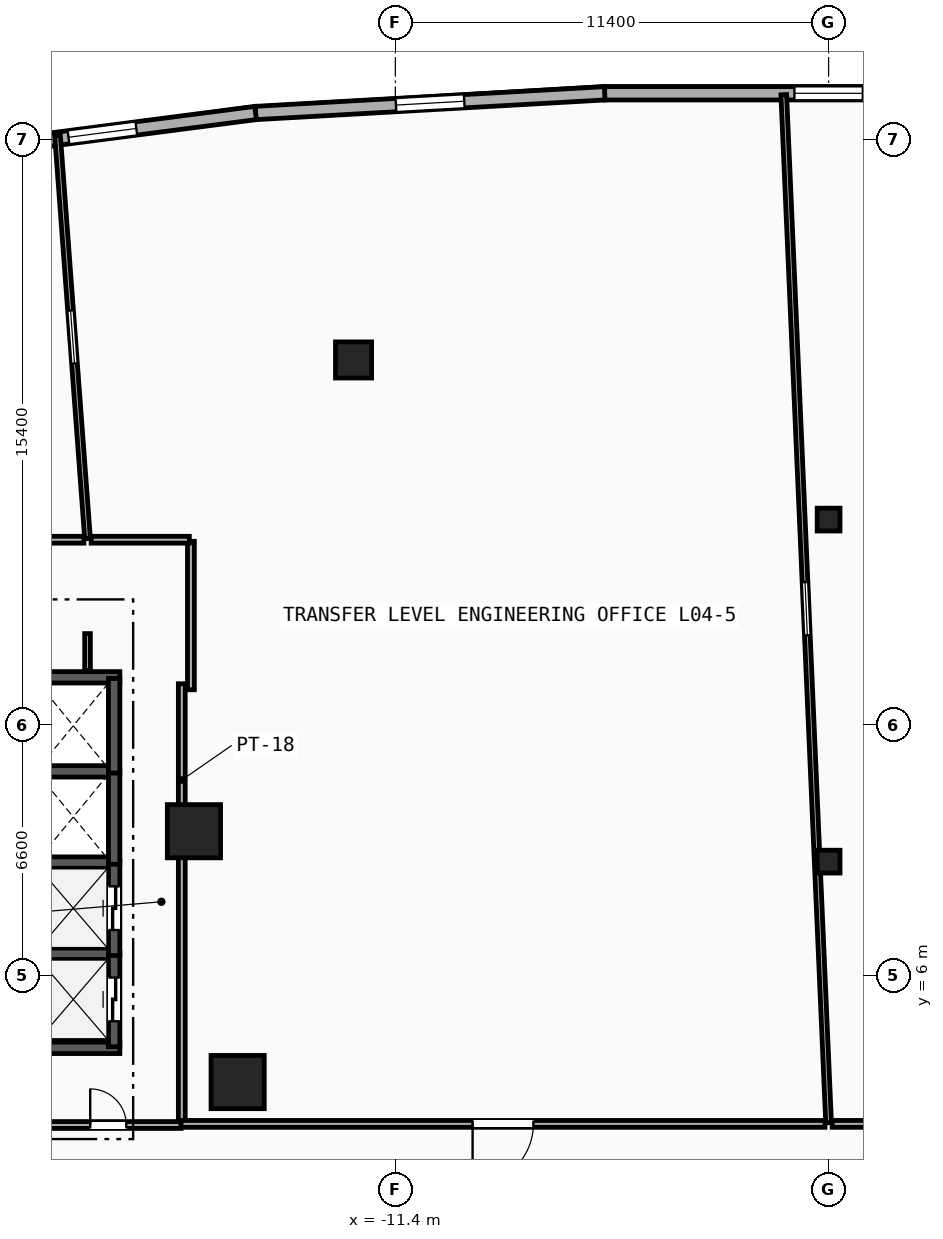
"""IFC4 building model, lengths in metres.
Left out: names, types, materials, properties, quantities, classifications, styles, units other than length and angle.
Written with IfcOpenShell. Run it as: python <this file> out.ifc"""

import sys

from ifc_helpers import new_model, si_unit, direction, frame, frame_2d, origin, origin_2d, place, context, subcontext, project, spatial, rectangle, hollow_rectangle, circle, extrude, element, fill, save


model = new_model("IFC4")
c1 = context("Model", 3, precision=1e-05, world=origin(), true_north=direction((0.0, 1.0)))
c2 = subcontext(c1, "Body", "Model", "MODEL_VIEW")
j1 = project(units=[si_unit("LENGTHUNIT", "METRE"), si_unit("PLANEANGLEUNIT", "RADIAN")], contexts=[c1])
p1 = place(None, origin())
s1 = spatial("IfcSite", under=j1, at=p1, CompositionType="ELEMENT")
p2 = place(p1, origin())
s2 = spatial("IfcBuilding", under=s1, at=p2, CompositionType="ELEMENT")
p3 = place(p2, frame((0.0, 0.0, 20.0)))
s3 = spatial("IfcBuildingStorey", under=s2, at=p3, CompositionType="ELEMENT", Elevation=20.0)
for number, where, z_axis, x_axis in (
    (1, (-15.55, 3.2, 0.0), (0.0, 0.0, 1.0), (1.0, 0.0, 0.0)),
    (2, (-16.7, 9.8, 0.0), (0.0, 0.0, 1.0), (1.0, 0.0, 0.0)),
):
    element("IfcColumn", number, at=place(p3, frame(where, z_axis=z_axis, x_axis=x_axis)), inside=s3, PredefinedType="COLUMN", context=c2, shape_type="SweptSolid", body=[
        extrude(rectangle(XDim=1.4, YDim=1.4, at=origin_2d()), origin(), (0.0, 0.0, 1.0), 4.0),
    ])
for number, where, z_axis, x_axis in (
    (3, (0.0, 9.0, 0.0), (0.0, 0.0, 1.0), (1.0, 0.0, 0.0)),
    (4, (0.0, 18.0, 0.0), (0.0, 0.0, 1.0), (1.0, 0.0, 0.0)),
):
    element("IfcColumn", number, at=place(p3, frame(where, z_axis=z_axis, x_axis=x_axis)), inside=s3, PredefinedType="COLUMN", context=c2, shape_type="SweptSolid", body=[
        extrude(hollow_rectangle(XDim=0.6, YDim=0.6, WallThickness=0.032, at=origin_2d()), origin(), (0.0, 0.0, 1.0), 3.695),
    ])
p4 = place(p3, frame((-12.5, 22.2, 0.0), z_axis=(0.0, 0.0, 1.0), x_axis=(1.0, 0.0, 0.0)))
e5 = element("IfcColumn", 5, at=p4, inside=s3, PredefinedType="PILASTER", context=c2, shape_type="SweptSolid", body=[
    extrude(circle(Radius=0.475, at=origin_2d()), origin(), (0.0, 0.0, 1.0), 3.695),
])
p5 = place(p3, frame((5.893, 29.216, 0.0), z_axis=(0.0, 0.0, 1.0), x_axis=(-1.0, 0.0, 0.0)))
e6 = element("IfcWall", 6, at=p5, inside=s3, PredefinedType="SOLIDWALL", context=c2, shape_type="SweptSolid", body=[
    extrude(rectangle(XDim=11.785, YDim=0.35, at=frame_2d((5.893, 0.0))), origin(), (0.0, 0.0, 1.0), 3.7),
])
p6 = place(p5, frame((4.992, 0.0, 0.45)))
e7 = element("IfcOpeningElement", 7, at=p6, cuts=e6, PredefinedType="OPENING", context=c2, shape_type="SweptSolid", body=[
    extrude(rectangle(XDim=1.8, YDim=2.4, at=frame_2d((0.9, 1.2))), frame((0.0, 0.185, 0.0), z_axis=(0.0, -1.0, 0.0), x_axis=(1.0, 0.0, 0.0)), (0.0, 0.0, 1.0), 0.37),
])
p7 = place(p3, frame((-5.893, 29.216, 0.0), z_axis=(0.0, 0.0, 1.0), x_axis=(-0.998413463137, -0.056307695976, 0.0)))
e8 = element("IfcWall", 8, at=p7, inside=s3, PredefinedType="SOLIDWALL", context=c2, shape_type="SweptSolid", body=[
    extrude(rectangle(XDim=9.201, YDim=0.35, at=frame_2d((4.6, 0.0))), origin(), (0.0, 0.0, 1.0), 3.7),
])
p8 = place(p7, frame((3.7, 0.0, 0.45)))
e9 = element("IfcOpeningElement", 9, at=p8, cuts=e8, PredefinedType="OPENING", context=c2, shape_type="SweptSolid", body=[
    extrude(rectangle(XDim=1.8, YDim=2.4, at=frame_2d((0.9, 1.2))), frame((0.0, 0.185, 0.0), z_axis=(0.0, -1.0, 0.0), x_axis=(1.0, 0.0, 0.0)), (0.0, 0.0, 1.0), 0.37),
])
p9 = place(p3, frame((-15.079, 28.698, 0.0), z_axis=(0.0, 0.0, 1.0), x_axis=(-0.991688106477, -0.128665067026, 0.0)))
e10 = element("IfcWall", 10, at=p9, inside=s3, PredefinedType="SOLIDWALL", context=c2, shape_type="SweptSolid", body=[
    extrude(rectangle(XDim=8.129, YDim=0.35, at=frame_2d((4.064, 0.0))), origin(), (0.0, 0.0, 1.0), 3.7),
])
p10 = place(p9, frame((3.164, 0.0, 0.45)))
e11 = element("IfcOpeningElement", 11, at=p10, cuts=e10, PredefinedType="OPENING", context=c2, shape_type="SweptSolid", body=[
    extrude(rectangle(XDim=1.8, YDim=2.4, at=frame_2d((0.9, 1.2))), frame((0.0, 0.185, 0.0), z_axis=(0.0, -1.0, 0.0), x_axis=(1.0, 0.0, 0.0)), (0.0, 0.0, 1.0), 0.37),
])
for number, where, z_axis, x_axis in (
    (12, (-20.8, 4.1, 0.0), (0.0, 0.0, 1.0), (1.0, 0.0, 0.0)),
    (13, (-20.8, 13.85, 0.0), (0.0, 0.0, 1.0), (1.0, 0.0, 0.0)),
):
    element("IfcWall", number, at=place(p3, frame(where, z_axis=z_axis, x_axis=x_axis)), inside=s3, PredefinedType="SHEAR", context=c2, shape_type="SweptSolid", body=[
        extrude(rectangle(XDim=2.15, YDim=0.3, at=frame_2d((1.075, 0.0))), origin(), (0.0, 0.0, 1.0), 3.7),
    ])
for number, where, z_axis, x_axis in (
    (14, (-20.8, 6.575, 0.0), (0.0, 0.0, 1.0), (1.0, 0.0, 0.0)),
    (15, (-20.8, 8.975, 0.0), (0.0, 0.0, 1.0), (1.0, 0.0, 0.0)),
    (16, (-20.8, 11.375, 0.0), (0.0, 0.0, 1.0), (1.0, 0.0, 0.0)),
):
    element("IfcWall", number, at=place(p3, frame(where, z_axis=z_axis, x_axis=x_axis)), inside=s3, PredefinedType="SHEAR", context=c2, shape_type="SweptSolid", body=[
        extrude(rectangle(XDim=1.85, YDim=0.3, at=frame_2d((0.925, 0.0))), origin(), (0.0, 0.0, 1.0), 3.7),
    ])
p11 = place(p3, frame((-18.8, 4.13, 0.0), z_axis=(0.0, 0.0, 1.0), x_axis=(0.0, 1.0, 0.0)))
e17 = element("IfcWall", 17, at=p11, inside=s3, PredefinedType="SHEAR", context=c2, shape_type="SweptSolid", body=[
    extrude(rectangle(XDim=2.49, YDim=0.3, at=frame_2d((1.245, 0.0))), origin(), (0.0, 0.0, 1.0), 3.7),
])
p12 = place(p11, frame((0.67, 0.0, 0.0)))
e18 = element("IfcOpeningElement", 18, at=p12, cuts=e17, PredefinedType="OPENING", context=c2, shape_type="SweptSolid", body=[
    extrude(rectangle(XDim=1.15, YDim=2.2, at=frame_2d((0.575, 1.1))), frame((0.0, 0.16, 0.0), z_axis=(0.0, -1.0, 0.0), x_axis=(1.0, 0.0, 0.0)), (0.0, 0.0, 1.0), 0.32),
])
p13 = place(p3, frame((-18.8, 6.53, 0.0), z_axis=(0.0, 0.0, 1.0), x_axis=(0.0, 1.0, 0.0)))
e19 = element("IfcWall", 19, at=p13, inside=s3, PredefinedType="SHEAR", context=c2, shape_type="SweptSolid", body=[
    extrude(rectangle(XDim=2.49, YDim=0.3, at=frame_2d((1.245, 0.0))), origin(), (0.0, 0.0, 1.0), 3.7),
])
p14 = place(p13, frame((0.67, 0.0, 0.0)))
e20 = element("IfcOpeningElement", 20, at=p14, cuts=e19, PredefinedType="OPENING", context=c2, shape_type="SweptSolid", body=[
    extrude(rectangle(XDim=1.15, YDim=2.2, at=frame_2d((0.575, 1.1))), frame((0.0, 0.16, 0.0), z_axis=(0.0, -1.0, 0.0), x_axis=(1.0, 0.0, 0.0)), (0.0, 0.0, 1.0), 0.32),
])
for number, where, z_axis, x_axis in (
    (21, (-18.8, 8.93, 0.0), (0.0, 0.0, 1.0), (0.0, 1.0, 0.0)),
    (22, (-18.8, 11.33, 0.0), (0.0, 0.0, 1.0), (0.0, 1.0, 0.0)),
):
    element("IfcWall", number, at=place(p3, frame(where, z_axis=z_axis, x_axis=x_axis)), inside=s3, PredefinedType="SHEAR", context=c2, shape_type="SweptSolid", body=[
        extrude(rectangle(XDim=2.49, YDim=0.3, at=frame_2d((1.245, 0.0))), origin(), (0.0, 0.0, 1.0), 3.7),
    ])
p15 = place(p3, frame((-17.02, 2.17, 0.0), z_axis=(0.0, 0.0, 1.0), x_axis=(0.0, 1.0, 0.0)))
e23 = element("IfcWall", 23, at=p15, inside=s3, PredefinedType="PARTITIONING", context=c2, shape_type="SweptSolid", body=[
    extrude(rectangle(XDim=11.51, YDim=0.18, at=frame_2d((5.755, 0.0))), origin(), (0.0, 0.0, 1.0), 1.9),
])
p16 = place(p3, frame((-20.87, 2.07, 0.0), z_axis=(0.0, 0.0, 1.0), x_axis=(1.0, 0.0, 0.0)))
e24 = element("IfcWall", 24, at=p16, inside=s3, PredefinedType="PARTITIONING", context=c2, shape_type="SweptSolid", body=[
    extrude(rectangle(XDim=3.83, YDim=0.18, at=frame_2d((1.915, 0.0))), origin(), (0.0, 0.0, 1.0), 3.7),
])
p17 = place(p16, frame((1.44, 0.0, 0.0)))
e25 = element("IfcOpeningElement", 25, at=p17, cuts=e24, PredefinedType="OPENING", context=c2, shape_type="SweptSolid", body=[
    extrude(rectangle(XDim=0.95, YDim=2.1, at=frame_2d((0.475, 1.05))), frame((0.0, 0.1, 0.0), z_axis=(0.0, -1.0, 0.0), x_axis=(1.0, 0.0, 0.0)), (0.0, 0.0, 1.0), 0.2),
])
p18 = place(p3, frame((-19.5, 14.03, 0.0), z_axis=(0.0, 0.0, 1.0), x_axis=(0.0, 1.0, 0.0)))
e26 = element("IfcWall", 26, at=p18, inside=s3, PredefinedType="PARTITIONING", context=c2, shape_type="SweptSolid", body=[
    extrude(rectangle(XDim=0.97, YDim=0.15, at=frame_2d((0.485, 0.0))), origin(), (0.0, 0.0, 1.0), 3.7),
])
p19 = place(p3, frame((-19.5, 17.5, 0.0), z_axis=(0.0, 0.0, 1.0), x_axis=(-0.074269014628, 0.997238243082, 0.0)))
e27 = element("IfcWall", 27, at=p19, inside=s3, PredefinedType="PARTITIONING", context=c2, shape_type="SweptSolid", body=[
    extrude(rectangle(XDim=10.637, YDim=0.15, at=frame_2d((5.319, 0.0))), origin(), (0.0, 0.0, 1.0), 3.7),
])
p20 = place(p19, frame((4.619, 0.0, 1.05)))
e28 = element("IfcOpeningElement", 28, at=p20, cuts=e27, PredefinedType="OPENING", context=c2, shape_type="SweptSolid", body=[
    extrude(rectangle(XDim=1.4, YDim=1.5, at=frame_2d((0.7, 0.75))), frame((0.0, 0.085, 0.0), z_axis=(0.0, -1.0, 0.0), x_axis=(1.0, 0.0, 0.0)), (0.0, 0.0, 1.0), 0.17),
])
p21 = place(p3, frame((0.0, 2.13, 0.0), z_axis=(0.0, 0.0, 1.0), x_axis=(-0.043560875221, 0.999050774561, 0.0)))
e29 = element("IfcWall", 29, at=p21, inside=s3, PredefinedType="PARTITIONING", context=c2, shape_type="SweptSolid", body=[
    extrude(rectangle(XDim=27.076, YDim=0.15, at=frame_2d((13.538, 0.0))), origin(), (0.0, 0.0, 1.0), 2.922),
])
p22 = place(p21, frame((12.838, 0.0, 1.05)))
e30 = element("IfcOpeningElement", 30, at=p22, cuts=e29, PredefinedType="OPENING", context=c2, shape_type="SweptSolid", body=[
    extrude(rectangle(XDim=1.4, YDim=1.5, at=frame_2d((0.7, 0.75))), frame((0.0, 0.085, 0.0), z_axis=(0.0, -1.0, 0.0), x_axis=(1.0, 0.0, 0.0)), (0.0, 0.0, 1.0), 0.17),
])
p23 = place(p3, frame((-19.595, 17.47, 0.0), z_axis=(0.0, 0.0, 1.0), x_axis=(-1.0, 0.0, 0.0)))
e31 = element("IfcWall", 31, at=p23, inside=s3, PredefinedType="PARTITIONING", context=c2, shape_type="SweptSolid", body=[
    extrude(rectangle(XDim=14.033, YDim=0.18, at=frame_2d((7.017, 0.0))), origin(), (0.0, 0.0, 1.0), 1.9),
])
p24 = place(p3, frame((-0.095, 2.1, 0.0), z_axis=(0.0, 0.0, 1.0), x_axis=(-1.0, 0.0, 0.0)))
e32 = element("IfcWall", 32, at=p24, inside=s3, PredefinedType="PARTITIONING", context=c2, shape_type="SweptSolid", body=[
    extrude(rectangle(XDim=16.945, YDim=0.18, at=frame_2d((8.473, 0.0))), origin(), (0.0, 0.0, 1.0), 2.922),
])
p25 = place(p24, frame((7.673, 0.0, 0.0)))
e33 = element("IfcOpeningElement", 33, at=p25, cuts=e32, PredefinedType="OPENING", context=c2, shape_type="SweptSolid", body=[
    extrude(rectangle(XDim=1.6, YDim=2.2, at=frame_2d((0.8, 1.1))), frame((0.0, 0.1, 0.0), z_axis=(0.0, -1.0, 0.0), x_axis=(1.0, 0.0, 0.0)), (0.0, 0.0, 1.0), 0.2),
])
p26 = place(p3, frame((-16.78, 13.521, 0.0), z_axis=(0.0, 0.0, 1.0), x_axis=(0.0, 1.0, 0.0)))
e34 = element("IfcWall", 34, at=p26, inside=s3, PredefinedType="PARTITIONING", context=c2, shape_type="SweptSolid", body=[
    extrude(rectangle(XDim=3.907, YDim=0.18, at=frame_2d((1.954, 0.0))), origin(), (0.0, 0.0, 1.0), 3.7),
])
p27 = place(p3, frame((-16.822, 17.47, 0.0), z_axis=(0.0, 0.0, 1.0), x_axis=(-1.0, 0.0, 0.0)))
e35 = element("IfcWall", 35, at=p27, inside=s3, PredefinedType="PARTITIONING", context=c2, shape_type="SweptSolid", body=[
    extrude(rectangle(XDim=2.583, YDim=0.18, at=frame_2d((1.292, 0.0))), origin(), (0.0, 0.0, 1.0), 3.7),
])
p28 = place(p3, frame((8.1, 2.1, 0.0), z_axis=(0.0, 0.0, 1.0), x_axis=(-1.0, 0.0, 0.0)))
e36 = element("IfcWall", 36, at=p28, inside=s3, PredefinedType="PARTITIONING", context=c2, shape_type="SweptSolid", body=[
    extrude(rectangle(XDim=8.005, YDim=0.18, at=frame_2d((4.002, 0.0))), origin(), (0.0, 0.0, 1.0), 3.7),
])
p29 = place(p28, frame((3.002, 0.0, 1.05)))
e37 = element("IfcOpeningElement", 37, at=p29, cuts=e36, PredefinedType="OPENING", context=c2, shape_type="SweptSolid", body=[
    extrude(rectangle(XDim=2.0, YDim=1.5, at=frame_2d((1.0, 0.75))), frame((0.0, 0.1, 0.0), z_axis=(0.0, -1.0, 0.0), x_axis=(1.0, 0.0, 0.0)), (0.0, 0.0, 1.0), 0.2),
])
p30 = place(p6, origin())
e38 = element("IfcWindow", 38, at=p30, inside=s3, PartitioningType="SINGLE_PANEL", PredefinedType="WINDOW", context=c2, shape_type="SweptSolid", body=[
    extrude(rectangle(XDim=1.8, YDim=2.4, at=frame_2d((0.9, 1.2))), frame((0.0, 0.03, 0.0), z_axis=(0.0, -1.0, 0.0), x_axis=(1.0, 0.0, 0.0)), (0.0, 0.0, 1.0), 0.06),
])
fill(e7, e38)
p31 = place(p8, origin())
e39 = element("IfcWindow", 39, at=p31, inside=s3, PartitioningType="SINGLE_PANEL", PredefinedType="WINDOW", context=c2, shape_type="SweptSolid", body=[
    extrude(rectangle(XDim=1.8, YDim=2.4, at=frame_2d((0.9, 1.2))), frame((0.0, 0.03, 0.0), z_axis=(0.0, -1.0, 0.0), x_axis=(1.0, 0.0, 0.0)), (0.0, 0.0, 1.0), 0.06),
])
fill(e9, e39)
p32 = place(p10, origin())
e40 = element("IfcWindow", 40, at=p32, inside=s3, PartitioningType="SINGLE_PANEL", PredefinedType="WINDOW", context=c2, shape_type="SweptSolid", body=[
    extrude(rectangle(XDim=1.8, YDim=2.4, at=frame_2d((0.9, 1.2))), frame((0.0, 0.03, 0.0), z_axis=(0.0, -1.0, 0.0), x_axis=(1.0, 0.0, 0.0)), (0.0, 0.0, 1.0), 0.06),
])
fill(e11, e40)
p33 = place(p12, origin())
e41 = element("IfcDoor", 41, at=p33, inside=s3, OperationType="SLIDING_TO_LEFT", PredefinedType="TRAPDOOR", context=c2, shape_type="SweptSolid", body=[
    extrude(rectangle(XDim=1.15, YDim=2.2, at=frame_2d((0.575, 1.1))), frame((0.0, 0.025, 0.0), z_axis=(0.0, -1.0, 0.0), x_axis=(1.0, 0.0, 0.0)), (0.0, 0.0, 1.0), 0.05),
])
fill(e18, e41)
p34 = place(p14, origin())
e42 = element("IfcDoor", 42, at=p34, inside=s3, OperationType="SLIDING_TO_LEFT", PredefinedType="TRAPDOOR", context=c2, shape_type="SweptSolid", body=[
    extrude(rectangle(XDim=1.15, YDim=2.2, at=frame_2d((0.575, 1.1))), frame((0.0, 0.025, 0.0), z_axis=(0.0, -1.0, 0.0), x_axis=(1.0, 0.0, 0.0)), (0.0, 0.0, 1.0), 0.05),
])
fill(e20, e42)
p35 = place(p25, origin())
e43 = element("IfcDoor", 43, at=p35, inside=s3, OperationType="SINGLE_SWING_RIGHT", PredefinedType="DOOR", context=c2, shape_type="SweptSolid", body=[
    extrude(rectangle(XDim=1.6, YDim=2.2, at=frame_2d((0.8, 1.1))), frame((0.0, 0.025, 0.0), z_axis=(0.0, -1.0, 0.0), x_axis=(1.0, 0.0, 0.0)), (0.0, 0.0, 1.0), 0.05),
])
fill(e33, e43)
p36 = place(p17, origin())
e44 = element("IfcDoor", 44, at=p36, inside=s3, OperationType="SINGLE_SWING_LEFT", PredefinedType="DOOR", context=c2, shape_type="SweptSolid", body=[
    extrude(rectangle(XDim=0.95, YDim=2.1, at=frame_2d((0.475, 1.05))), frame((0.0, 0.025, 0.0), z_axis=(0.0, -1.0, 0.0), x_axis=(1.0, 0.0, 0.0)), (0.0, 0.0, 1.0), 0.05),
])
fill(e25, e44)
p37 = place(p20, origin())
e45 = element("IfcWindow", 45, at=p37, inside=s3, PartitioningType="SINGLE_PANEL", PredefinedType="WINDOW", context=c2, shape_type="SweptSolid", body=[
    extrude(rectangle(XDim=1.4, YDim=1.5, at=frame_2d((0.7, 0.75))), frame((0.0, 0.03, 0.0), z_axis=(0.0, -1.0, 0.0), x_axis=(1.0, 0.0, 0.0)), (0.0, 0.0, 1.0), 0.06),
])
fill(e28, e45)
p38 = place(p22, origin())
e46 = element("IfcWindow", 46, at=p38, inside=s3, PartitioningType="SINGLE_PANEL", PredefinedType="WINDOW", context=c2, shape_type="SweptSolid", body=[
    extrude(rectangle(XDim=1.4, YDim=1.5, at=frame_2d((0.7, 0.75))), frame((0.0, 0.03, 0.0), z_axis=(0.0, -1.0, 0.0), x_axis=(1.0, 0.0, 0.0)), (0.0, 0.0, 1.0), 0.06),
])
fill(e30, e46)
save(model, sys.argv[1])
